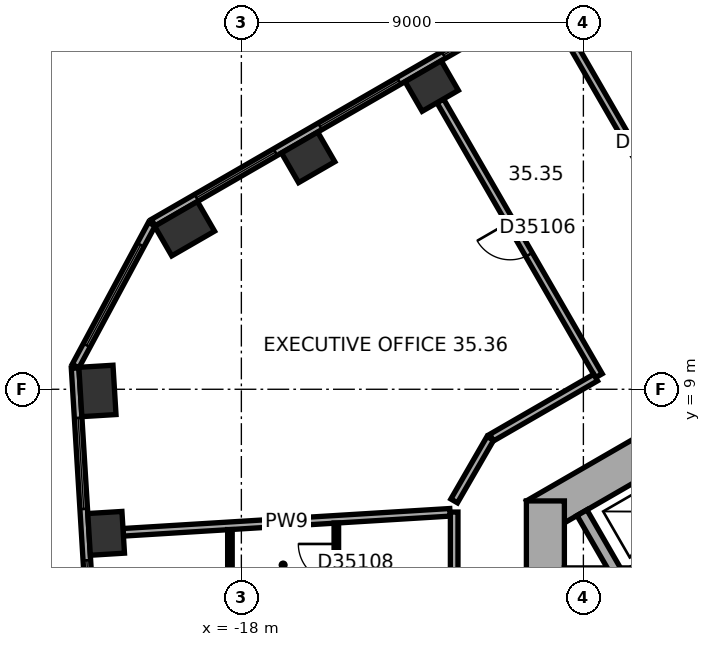
"""IFC4 building model, lengths in metres.
Left out: names, types, materials, properties, quantities, classifications, styles, units other than length and angle.
Written with IfcOpenShell. Run it as: python <this file> out.ifc"""

import sys

from ifc_helpers import new_model, si_unit, direction, frame, frame_2d, origin, origin_2d, place, context, subcontext, project, spatial, rectangle, extrude, element, fill, save


model = new_model("IFC4")
c1 = context("Model", 3, precision=1e-05, world=origin(), true_north=direction((0.0, 1.0)))
c2 = subcontext(c1, "Body", "Model", "MODEL_VIEW")
j1 = project(units=[si_unit("LENGTHUNIT", "METRE"), si_unit("PLANEANGLEUNIT", "RADIAN")], contexts=[c1])
p1 = place(None, origin())
s1 = spatial("IfcSite", under=j1, at=p1, CompositionType="ELEMENT")
p2 = place(p1, origin())
s2 = spatial("IfcBuilding", under=s1, at=p2, CompositionType="ELEMENT")
p3 = place(p2, frame((0.0, 0.0, 146.6)))
s3 = spatial("IfcBuildingStorey", under=s2, at=p3, CompositionType="ELEMENT", Elevation=146.6)
for number, where, z_axis, x_axis in (
    (1, (-12.991, 16.979, 0.0), (0.0, 0.0, 1.0), (-0.866, -0.5, 0.0)),
    (2, (-16.242, 15.102, 0.0), (0.0, 0.0, 1.0), (-0.866, -0.5, 0.0)),
):
    element("IfcColumn", number, at=place(p3, frame(where, z_axis=z_axis, x_axis=x_axis)), inside=s3, PredefinedType="COLUMN", context=c2, shape_type="SweptSolid", body=[
        extrude(rectangle(XDim=1.1, YDim=0.9, at=origin_2d()), origin(), (0.0, 0.0, 1.0), 3.7),
    ])
for number, where, z_axis, x_axis in (
    (3, (-19.494, 13.225, 0.0), (0.0, 0.0, 1.0), (-0.866, -0.5, 0.0)),
    (4, (-21.787, 8.956, 0.0), (0.0, 0.0, 1.0), (0.061, -0.998, 0.0)),
):
    element("IfcColumn", number, at=place(p3, frame(where, z_axis=z_axis, x_axis=x_axis)), inside=s3, PredefinedType="COLUMN", context=c2, shape_type="SweptSolid", body=[
        extrude(rectangle(XDim=1.3, YDim=0.9, at=origin_2d()), origin(), (0.0, 0.0, 1.0), 3.7),
    ])
p4 = place(p3, frame((-21.558, 5.209, 0.0), z_axis=(0.0, 0.0, 1.0), x_axis=(0.061048539535, -0.998134798422, 0.0)))
e5 = element("IfcColumn", 5, at=p4, inside=s3, PredefinedType="COLUMN", context=c2, shape_type="SweptSolid", body=[
    extrude(rectangle(XDim=1.1, YDim=0.9, at=origin_2d()), origin(), (0.0, 0.0, 1.0), 3.7),
])
p5 = place(p3, frame((0.25, 11.691, 0.0), z_axis=(0.0, 0.0, 1.0), x_axis=(-0.866022616891, -0.50000482701, 0.0)))
e6 = element("IfcWall", 6, at=p5, inside=s3, PredefinedType="SHEAR", context=c2, shape_type="SweptSolid", body=[
    extrude(rectangle(XDim=12.125, YDim=1.0, at=frame_2d((6.062, 0.0))), origin(), (0.0, 0.0, 1.0), 3.7),
])
p6 = place(p5, frame((6.262, 0.0, 0.0)))
e7 = element("IfcOpeningElement", 7, at=p6, cuts=e6, PredefinedType="OPENING", context=c2, shape_type="SweptSolid", body=[
    extrude(rectangle(XDim=1.5, YDim=2.1, at=frame_2d((0.75, 1.05))), frame((0.0, 0.51, 0.0), z_axis=(0.0, -1.0, 0.0), x_axis=(1.0, 0.0, 0.0)), (0.0, 0.0, 1.0), 1.02),
])
p7 = place(p5, frame((1.812, 0.0, 0.0)))
e8 = element("IfcOpeningElement", 8, at=p7, cuts=e6, PredefinedType="OPENING", context=c2, shape_type="SweptSolid", body=[
    extrude(rectangle(XDim=0.9, YDim=2.1, at=frame_2d((0.45, 1.05))), frame((0.0, 0.51, 0.0), z_axis=(0.0, -1.0, 0.0), x_axis=(1.0, 0.0, 0.0)), (0.0, 0.0, 1.0), 1.02),
])
p8 = place(p5, frame((4.412, 0.0, 0.0)))
e9 = element("IfcOpeningElement", 9, at=p8, cuts=e6, PredefinedType="OPENING", context=c2, shape_type="SweptSolid", body=[
    extrude(rectangle(XDim=0.9, YDim=2.1, at=frame_2d((0.45, 1.05))), frame((0.0, 0.51, 0.0), z_axis=(0.0, -1.0, 0.0), x_axis=(1.0, 0.0, 0.0)), (0.0, 0.0, 1.0), 1.02),
])
p9 = place(p3, frame((-10.0, 6.062, 0.0), z_axis=(0.0, 0.0, 1.0), x_axis=(0.0, -1.0, 0.0)))
e10 = element("IfcWall", 10, at=p9, inside=s3, PredefinedType="SHEAR", context=c2, shape_type="SweptSolid", body=[
    extrude(rectangle(XDim=12.125, YDim=1.0, at=frame_2d((6.062, 0.0))), origin(), (0.0, 0.0, 1.0), 3.7),
])
p10 = place(p9, frame((5.212, 0.0, 0.0)))
e11 = element("IfcOpeningElement", 11, at=p10, cuts=e10, PredefinedType="OPENING", context=c2, shape_type="SweptSolid", body=[
    extrude(rectangle(XDim=1.1, YDim=2.1, at=frame_2d((0.55, 1.05))), frame((0.0, 0.51, 0.0), z_axis=(0.0, -1.0, 0.0), x_axis=(1.0, 0.0, 0.0)), (0.0, 0.0, 1.0), 1.02),
])
p11 = place(p9, frame((7.812, 0.0, 0.0)))
e12 = element("IfcOpeningElement", 12, at=p11, cuts=e10, PredefinedType="OPENING", context=c2, shape_type="SweptSolid", body=[
    extrude(rectangle(XDim=1.1, YDim=2.1, at=frame_2d((0.55, 1.05))), frame((0.0, 0.51, 0.0), z_axis=(0.0, -1.0, 0.0), x_axis=(1.0, 0.0, 0.0)), (0.0, 0.0, 1.0), 1.02),
])
p12 = place(p3, frame((-2.961, 23.405, 0.0), z_axis=(0.0, 0.0, 1.0), x_axis=(-0.866023315909, -0.500003616288, 0.0)))
e13 = element("IfcWall", 13, at=p12, inside=s3, PredefinedType="STANDARD", context=c2, shape_type="SweptSolid", body=[
    extrude(rectangle(XDim=20.044, YDim=0.2, at=frame_2d((10.022, 0.0))), origin(), (0.0, 0.0, 1.0), 3.7),
])
p13 = place(p12, frame((1.314, 0.0, 0.9)))
e14 = element("IfcOpeningElement", 14, at=p13, cuts=e13, PredefinedType="OPENING", context=c2, shape_type="SweptSolid", body=[
    extrude(rectangle(XDim=2.4, YDim=2.0, at=frame_2d((1.2, 1.0))), frame((0.0, 0.11, 0.0), z_axis=(0.0, -1.0, 0.0), x_axis=(1.0, 0.0, 0.0)), (0.0, 0.0, 1.0), 0.22),
])
p14 = place(p12, frame((5.069, 0.0, 0.9)))
e15 = element("IfcOpeningElement", 15, at=p14, cuts=e13, PredefinedType="OPENING", context=c2, shape_type="SweptSolid", body=[
    extrude(rectangle(XDim=2.4, YDim=2.0, at=frame_2d((1.2, 1.0))), frame((0.0, 0.11, 0.0), z_axis=(0.0, -1.0, 0.0), x_axis=(1.0, 0.0, 0.0)), (0.0, 0.0, 1.0), 0.22),
])
p15 = place(p12, frame((8.823, 0.0, 0.9)))
e16 = element("IfcOpeningElement", 16, at=p15, cuts=e13, PredefinedType="OPENING", context=c2, shape_type="SweptSolid", body=[
    extrude(rectangle(XDim=2.4, YDim=2.0, at=frame_2d((1.2, 1.0))), frame((0.0, 0.11, 0.0), z_axis=(0.0, -1.0, 0.0), x_axis=(1.0, 0.0, 0.0)), (0.0, 0.0, 1.0), 0.22),
])
p16 = place(p12, frame((12.577, 0.0, 0.9)))
e17 = element("IfcOpeningElement", 17, at=p16, cuts=e13, PredefinedType="OPENING", context=c2, shape_type="SweptSolid", body=[
    extrude(rectangle(XDim=2.4, YDim=2.0, at=frame_2d((1.2, 1.0))), frame((0.0, 0.11, 0.0), z_axis=(0.0, -1.0, 0.0), x_axis=(1.0, 0.0, 0.0)), (0.0, 0.0, 1.0), 0.22),
])
p17 = place(p12, frame((16.331, 0.0, 0.9)))
e18 = element("IfcOpeningElement", 18, at=p17, cuts=e13, PredefinedType="OPENING", context=c2, shape_type="SweptSolid", body=[
    extrude(rectangle(XDim=2.4, YDim=2.0, at=frame_2d((1.2, 1.0))), frame((0.0, 0.11, 0.0), z_axis=(0.0, -1.0, 0.0), x_axis=(1.0, 0.0, 0.0)), (0.0, 0.0, 1.0), 0.22),
])
p18 = place(p3, frame((-20.357, 13.344, 0.0), z_axis=(0.0, 0.0, 1.0), x_axis=(-0.473288913494, -0.880907262068, 0.0)))
e19 = element("IfcWall", 19, at=p18, inside=s3, PredefinedType="STANDARD", context=c2, shape_type="SweptSolid", body=[
    extrude(rectangle(XDim=4.238, YDim=0.2, at=frame_2d((2.119, 0.0))), origin(), (0.0, 0.0, 1.0), 3.7),
])
p19 = place(p18, frame((0.619, 0.0, 0.9)))
e20 = element("IfcOpeningElement", 20, at=p19, cuts=e19, PredefinedType="OPENING", context=c2, shape_type="SweptSolid", body=[
    extrude(rectangle(XDim=3.0, YDim=2.0, at=frame_2d((1.5, 1.0))), frame((0.0, 0.11, 0.0), z_axis=(0.0, -1.0, 0.0), x_axis=(1.0, 0.0, 0.0)), (0.0, 0.0, 1.0), 0.22),
])
p20 = place(p3, frame((-22.375, 9.557, 0.0), z_axis=(0.0, 0.0, 1.0), x_axis=(0.061036015339, -0.998135564356, 0.0)))
e21 = element("IfcWall", 21, at=p20, inside=s3, PredefinedType="STANDARD", context=c2, shape_type="SweptSolid", body=[
    extrude(rectangle(XDim=20.044, YDim=0.2, at=frame_2d((10.022, 0.0))), origin(), (0.0, 0.0, 1.0), 3.7),
])
p21 = place(p20, frame((1.313, 0.0, 0.9)))
e22 = element("IfcOpeningElement", 22, at=p21, cuts=e21, PredefinedType="OPENING", context=c2, shape_type="SweptSolid", body=[
    extrude(rectangle(XDim=2.4, YDim=2.0, at=frame_2d((1.2, 1.0))), frame((0.0, 0.11, 0.0), z_axis=(0.0, -1.0, 0.0), x_axis=(1.0, 0.0, 0.0)), (0.0, 0.0, 1.0), 0.22),
])
p22 = place(p20, frame((5.067, 0.0, 0.9)))
e23 = element("IfcOpeningElement", 23, at=p22, cuts=e21, PredefinedType="OPENING", context=c2, shape_type="SweptSolid", body=[
    extrude(rectangle(XDim=2.4, YDim=2.0, at=frame_2d((1.2, 1.0))), frame((0.0, 0.11, 0.0), z_axis=(0.0, -1.0, 0.0), x_axis=(1.0, 0.0, 0.0)), (0.0, 0.0, 1.0), 0.22),
])
p23 = place(p20, frame((8.821, 0.0, 0.9)))
e24 = element("IfcOpeningElement", 24, at=p23, cuts=e21, PredefinedType="OPENING", context=c2, shape_type="SweptSolid", body=[
    extrude(rectangle(XDim=2.4, YDim=2.0, at=frame_2d((1.2, 1.0))), frame((0.0, 0.11, 0.0), z_axis=(0.0, -1.0, 0.0), x_axis=(1.0, 0.0, 0.0)), (0.0, 0.0, 1.0), 0.22),
])
p24 = place(p20, frame((12.575, 0.0, 0.9)))
e25 = element("IfcOpeningElement", 25, at=p24, cuts=e21, PredefinedType="OPENING", context=c2, shape_type="SweptSolid", body=[
    extrude(rectangle(XDim=2.4, YDim=2.0, at=frame_2d((1.2, 1.0))), frame((0.0, 0.11, 0.0), z_axis=(0.0, -1.0, 0.0), x_axis=(1.0, 0.0, 0.0)), (0.0, 0.0, 1.0), 0.22),
])
p25 = place(p20, frame((16.329, 0.0, 0.9)))
e26 = element("IfcOpeningElement", 26, at=p25, cuts=e21, PredefinedType="OPENING", context=c2, shape_type="SweptSolid", body=[
    extrude(rectangle(XDim=2.4, YDim=2.0, at=frame_2d((1.2, 1.0))), frame((0.0, 0.11, 0.0), z_axis=(0.0, -1.0, 0.0), x_axis=(1.0, 0.0, 0.0)), (0.0, 0.0, 1.0), 0.22),
])
p26 = place(p3, frame((-5.24, 5.577, 0.0), z_axis=(0.0, 0.0, 1.0), x_axis=(-0.866014461049, -0.500018952895, 0.0)))
e27 = element("IfcWall", 27, at=p26, inside=s3, PredefinedType="SHEAR", context=c2, shape_type="SweptSolid", body=[
    extrude(rectangle(XDim=3.35, YDim=0.3, at=frame_2d((1.675, 0.0))), origin(), (0.0, 0.0, 1.0), 3.42),
])
p27 = place(p3, frame((-7.937, 3.847, 0.0), z_axis=(0.0, 0.0, 1.0), x_axis=(-0.50002983664, 0.866008176907, 0.0)))
e28 = element("IfcWall", 28, at=p27, inside=s3, PredefinedType="SHEAR", context=c2, shape_type="SweptSolid", body=[
    extrude(rectangle(XDim=2.2, YDim=0.3, at=frame_2d((1.1, 0.0))), origin(), (0.0, 0.0, 1.0), 3.42),
])
p28 = place(p3, frame((-21.109, 5.237, 0.0), z_axis=(0.0, 0.0, 1.0), x_axis=(0.998135264293, 0.061040922131, 0.0)))
e29 = element("IfcWall", 29, at=p28, inside=s3, PredefinedType="PARTITIONING", context=c2, shape_type="SweptSolid", body=[
    extrude(rectangle(XDim=8.615, YDim=0.2, at=frame_2d((4.308, 0.0))), origin(), (0.0, 0.0, 1.0), 3.42),
])
p29 = place(p3, frame((-18.301, 5.308, 0.0), z_axis=(0.0, 0.0, 1.0), x_axis=(0.0, -1.0, 0.0)))
e30 = element("IfcWall", 30, at=p29, inside=s3, PredefinedType="PARTITIONING", context=c2, shape_type="SweptSolid", body=[
    extrude(rectangle(XDim=1.869, YDim=0.12, at=frame_2d((0.934, 0.0))), origin(), (0.0, 0.0, 1.0), 3.42),
])
p30 = place(p3, frame((-15.501, 5.479, 0.0), z_axis=(0.0, 0.0, 1.0), x_axis=(0.0, -1.0, 0.0)))
e31 = element("IfcWall", 31, at=p30, inside=s3, PredefinedType="PARTITIONING", context=c2, shape_type="SweptSolid", body=[
    extrude(rectangle(XDim=11.083, YDim=0.12, at=frame_2d((5.542, 0.0))), origin(), (0.0, 0.0, 1.0), 3.42),
])
p31 = place(p30, frame((0.55, 0.0, 0.0)))
e32 = element("IfcOpeningElement", 32, at=p31, cuts=e31, PredefinedType="OPENING", context=c2, shape_type="SweptSolid", body=[
    extrude(rectangle(XDim=1.0, YDim=2.1, at=frame_2d((0.5, 1.05))), frame((0.0, 0.07, 0.0), z_axis=(0.0, -1.0, 0.0), x_axis=(1.0, 0.0, 0.0)), (0.0, 0.0, 1.0), 0.14),
])
p32 = place(p30, frame((3.636, 0.0, 0.0)))
e33 = element("IfcOpeningElement", 33, at=p32, cuts=e31, PredefinedType="OPENING", context=c2, shape_type="SweptSolid", body=[
    extrude(rectangle(XDim=0.9, YDim=2.1, at=frame_2d((0.45, 1.05))), frame((0.0, 0.07, 0.0), z_axis=(0.0, -1.0, 0.0), x_axis=(1.0, 0.0, 0.0)), (0.0, 0.0, 1.0), 0.14),
])
p33 = place(p30, frame((8.127, 0.0, 0.0)))
e34 = element("IfcOpeningElement", 34, at=p33, cuts=e31, PredefinedType="OPENING", context=c2, shape_type="SweptSolid", body=[
    extrude(rectangle(XDim=0.9, YDim=2.1, at=frame_2d((0.45, 1.05))), frame((0.0, 0.07, 0.0), z_axis=(0.0, -1.0, 0.0), x_axis=(1.0, 0.0, 0.0)), (0.0, 0.0, 1.0), 0.14),
])
p34 = place(p3, frame((-12.766, 16.589, 0.0), z_axis=(0.0, 0.0, 1.0), x_axis=(0.500010139422, -0.866019549707, 0.0)))
e35 = element("IfcWall", 35, at=p34, inside=s3, PredefinedType="PARTITIONING", context=c2, shape_type="SweptSolid", body=[
    extrude(rectangle(XDim=8.35, YDim=0.2, at=frame_2d((4.175, 0.0))), origin(), (0.0, 0.0, 1.0), 3.42),
])
p35 = place(p34, frame((3.675, 0.0, 0.0)))
e36 = element("IfcOpeningElement", 36, at=p35, cuts=e35, PredefinedType="OPENING", context=c2, shape_type="SweptSolid", body=[
    extrude(rectangle(XDim=1.0, YDim=2.1, at=frame_2d((0.5, 1.05))), frame((0.0, 0.11, 0.0), z_axis=(0.0, -1.0, 0.0), x_axis=(1.0, 0.0, 0.0)), (0.0, 0.0, 1.0), 0.22),
])
p36 = place(p3, frame((-12.4, 5.769, 0.0), z_axis=(0.0, 0.0, 1.0), x_axis=(0.0, -1.0, 0.0)))
e37 = element("IfcWall", 37, at=p36, inside=s3, PredefinedType="PARTITIONING", context=c2, shape_type="SweptSolid", body=[
    extrude(rectangle(XDim=3.568, YDim=0.2, at=frame_2d((1.784, 0.0))), origin(), (0.0, 0.0, 1.0), 3.42),
])
p37 = place(p3, frame((-11.45, 7.708, 0.0), z_axis=(0.0, 0.0, 1.0), x_axis=(-0.500022797313, -0.86601224135, 0.0)))
e38 = element("IfcWall", 38, at=p37, inside=s3, PredefinedType="PARTITIONING", context=c2, shape_type="SweptSolid", body=[
    extrude(rectangle(XDim=1.9, YDim=0.2, at=frame_2d((0.95, 0.0))), origin(), (0.0, 0.0, 1.0), 3.42),
])
p38 = place(p3, frame((-9.515, 18.466, 0.0), z_axis=(0.0, 0.0, 1.0), x_axis=(0.500010139422, -0.866019549707, 0.0)))
e39 = element("IfcWall", 39, at=p38, inside=s3, PredefinedType="PARTITIONING", context=c2, shape_type="SweptSolid", body=[
    extrude(rectangle(XDim=8.35, YDim=0.2, at=frame_2d((4.175, 0.0))), origin(), (0.0, 0.0, 1.0), 2.87),
])
p39 = place(p38, frame((3.275, 0.0, 0.0)))
e40 = element("IfcOpeningElement", 40, at=p39, cuts=e39, PredefinedType="OPENING", context=c2, shape_type="SweptSolid", body=[
    extrude(rectangle(XDim=1.0, YDim=2.1, at=frame_2d((0.5, 1.05))), frame((0.0, 0.11, 0.0), z_axis=(0.0, -1.0, 0.0), x_axis=(1.0, 0.0, 0.0)), (0.0, 0.0, 1.0), 0.22),
])
p40 = place(p3, frame((-8.678, 9.308, 0.0), z_axis=(0.0, 0.0, 1.0), x_axis=(-0.866000359435, -0.500043375578, 0.0)))
e41 = element("IfcWall", 41, at=p40, inside=s3, PredefinedType="PARTITIONING", context=c2, shape_type="SweptSolid", body=[
    extrude(rectangle(XDim=3.161, YDim=0.2, at=frame_2d((1.581, 0.0))), origin(), (0.0, 0.0, 1.0), 3.42),
])
p41 = place(p15, origin())
e42 = element("IfcWindow", 42, at=p41, inside=s3, PartitioningType="SINGLE_PANEL", PredefinedType="WINDOW", context=c2, shape_type="SweptSolid", body=[
    extrude(rectangle(XDim=2.4, YDim=2.0, at=frame_2d((1.2, 1.0))), frame((0.0, 0.03, 0.0), z_axis=(0.0, -1.0, 0.0), x_axis=(1.0, 0.0, 0.0)), (0.0, 0.0, 1.0), 0.06),
])
fill(e16, e42)
p42 = place(p16, origin())
e43 = element("IfcWindow", 43, at=p42, inside=s3, PartitioningType="SINGLE_PANEL", PredefinedType="WINDOW", context=c2, shape_type="SweptSolid", body=[
    extrude(rectangle(XDim=2.4, YDim=2.0, at=frame_2d((1.2, 1.0))), frame((0.0, 0.03, 0.0), z_axis=(0.0, -1.0, 0.0), x_axis=(1.0, 0.0, 0.0)), (0.0, 0.0, 1.0), 0.06),
])
fill(e17, e43)
p43 = place(p17, origin())
e44 = element("IfcWindow", 44, at=p43, inside=s3, PartitioningType="SINGLE_PANEL", PredefinedType="WINDOW", context=c2, shape_type="SweptSolid", body=[
    extrude(rectangle(XDim=2.4, YDim=2.0, at=frame_2d((1.2, 1.0))), frame((0.0, 0.03, 0.0), z_axis=(0.0, -1.0, 0.0), x_axis=(1.0, 0.0, 0.0)), (0.0, 0.0, 1.0), 0.06),
])
fill(e18, e44)
p44 = place(p19, origin())
e45 = element("IfcWindow", 45, at=p44, inside=s3, PartitioningType="SINGLE_PANEL", PredefinedType="WINDOW", context=c2, shape_type="SweptSolid", body=[
    extrude(rectangle(XDim=3.0, YDim=2.0, at=frame_2d((1.5, 1.0))), frame((0.0, 0.03, 0.0), z_axis=(0.0, -1.0, 0.0), x_axis=(1.0, 0.0, 0.0)), (0.0, 0.0, 1.0), 0.06),
])
fill(e20, e45)
p45 = place(p21, origin())
e46 = element("IfcWindow", 46, at=p45, inside=s3, PartitioningType="SINGLE_PANEL", PredefinedType="WINDOW", context=c2, shape_type="SweptSolid", body=[
    extrude(rectangle(XDim=2.4, YDim=2.0, at=frame_2d((1.2, 1.0))), frame((0.0, 0.03, 0.0), z_axis=(0.0, -1.0, 0.0), x_axis=(1.0, 0.0, 0.0)), (0.0, 0.0, 1.0), 0.06),
])
fill(e22, e46)
p46 = place(p22, origin())
e47 = element("IfcWindow", 47, at=p46, inside=s3, PartitioningType="SINGLE_PANEL", PredefinedType="WINDOW", context=c2, shape_type="SweptSolid", body=[
    extrude(rectangle(XDim=2.4, YDim=2.0, at=frame_2d((1.2, 1.0))), frame((0.0, 0.03, 0.0), z_axis=(0.0, -1.0, 0.0), x_axis=(1.0, 0.0, 0.0)), (0.0, 0.0, 1.0), 0.06),
])
fill(e23, e47)
p47 = place(p39, origin())
e48 = element("IfcDoor", 48, at=p47, inside=s3, OperationType="SINGLE_SWING_LEFT", PredefinedType="DOOR", context=c2, shape_type="SweptSolid", body=[
    extrude(rectangle(XDim=1.0, YDim=2.1, at=frame_2d((0.5, 1.05))), frame((0.0, 0.025, 0.0), z_axis=(0.0, -1.0, 0.0), x_axis=(1.0, 0.0, 0.0)), (0.0, 0.0, 1.0), 0.05),
])
fill(e40, e48)
p48 = place(p35, origin())
e49 = element("IfcDoor", 49, at=p48, inside=s3, OperationType="SINGLE_SWING_LEFT", PredefinedType="DOOR", context=c2, shape_type="SweptSolid", body=[
    extrude(rectangle(XDim=1.0, YDim=2.1, at=frame_2d((0.5, 1.05))), frame((0.0, 0.025, 0.0), z_axis=(0.0, -1.0, 0.0), x_axis=(1.0, 0.0, 0.0)), (0.0, 0.0, 1.0), 0.05),
])
fill(e36, e49)
p49 = place(p31, origin())
e50 = element("IfcDoor", 50, at=p49, inside=s3, OperationType="SINGLE_SWING_LEFT", PredefinedType="DOOR", context=c2, shape_type="SweptSolid", body=[
    extrude(rectangle(XDim=1.0, YDim=2.1, at=frame_2d((0.5, 1.05))), frame((0.0, 0.025, 0.0), z_axis=(0.0, -1.0, 0.0), x_axis=(1.0, 0.0, 0.0)), (0.0, 0.0, 1.0), 0.05),
])
fill(e32, e50)
save(model, sys.argv[1])
